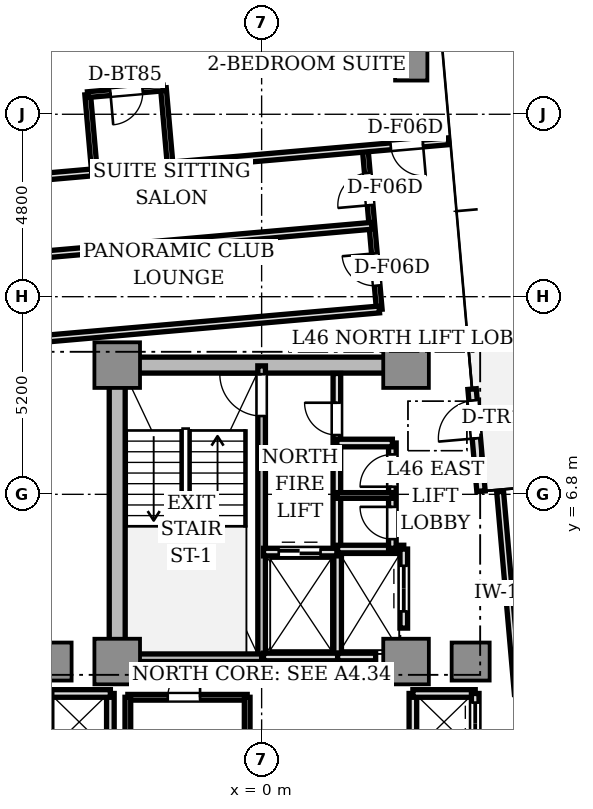
"""IFC4 building model, lengths in metres.
Left out: names, types, materials, properties, quantities, classifications, styles, units other than length and angle.
Written with IfcOpenShell. Run it as: python <this file> out.ifc"""

import sys

from ifc_helpers import new_model, si_unit, direction, frame, frame_2d, origin, origin_2d, place, context, subcontext, project, spatial, rectangle, extrude, source, transform, mapped, element, fill, save


model = new_model("IFC4")
c1 = context("Model", 3, precision=1e-05, world=origin(), true_north=direction((0.0, 1.0)))
c2 = subcontext(c1, "Body", "Model", "MODEL_VIEW")
j1 = project(units=[si_unit("LENGTHUNIT", "METRE"), si_unit("PLANEANGLEUNIT", "RADIAN")], contexts=[c1])
p1 = place(None, origin())
s1 = spatial("IfcSite", under=j1, at=p1, CompositionType="ELEMENT")
p2 = place(p1, origin())
s2 = spatial("IfcBuilding", under=s1, at=p2, CompositionType="ELEMENT")
p3 = place(p2, frame((0.0, 0.0, 167.35)))
s3 = spatial("IfcBuildingStorey", under=s2, at=p3, CompositionType="ELEMENT", Elevation=167.35)
p4 = place(p3, frame((-3.55, 10.2, 0.0), z_axis=(0.0, 0.0, 1.0), x_axis=(1.0, 0.0, 0.0)))
e1 = element("IfcWall", 1, at=p4, inside=s3, PredefinedType="SHEAR", context=c2, shape_type="SweptSolid", body=[
    extrude(rectangle(XDim=7.1, YDim=0.42, at=frame_2d((3.55, 0.0))), origin(), (0.0, 0.0, 1.0), 3.05),
])
p5 = place(p3, frame((-3.8, 2.85, 0.0), z_axis=(0.0, 0.0, 1.0), x_axis=(0.0, 1.0, 0.0)))
e2 = element("IfcWall", 2, at=p5, inside=s3, PredefinedType="SHEAR", context=c2, shape_type="SweptSolid", body=[
    extrude(rectangle(XDim=6.9, YDim=0.42, at=frame_2d((3.45, 0.0))), origin(), (0.0, 0.0, 1.0), 3.05),
])
m1 = source(origin(), c2, "Body", "SweptSolid", [
    extrude(rectangle(XDim=1.2, YDim=1.2, at=origin_2d()), origin(), (0.0, 0.0, 1.0), 3.05),
])
for number, where, z_axis, x_axis in (
    (3, (-3.8, 2.4, 0.0), (0.0, 0.0, 1.0), (1.0, 0.0, 0.0)),
    (4, (3.8, 2.4, 0.0), (0.0, 0.0, 1.0), (1.0, 0.0, 0.0)),
    (5, (-3.8, 10.2, 0.0), (0.0, 0.0, 1.0), (1.0, 0.0, 0.0)),
    (6, (3.8, 10.2, 0.0), (0.0, 0.0, 1.0), (1.0, 0.0, 0.0)),
):
    element("IfcColumn", number, at=place(p3, frame(where, z_axis=z_axis, x_axis=x_axis)), inside=s3, PredefinedType="COLUMN", context=c2, shape_type="MappedRepresentation", body=[
        mapped(m1, transform((0.0, 0.0, 0.0), scale=1.0)),
    ])
m2 = source(origin(), c2, "Body", "SweptSolid", [
    extrude(rectangle(XDim=1.0, YDim=1.0, at=origin_2d()), origin(), (0.0, 0.0, 1.0), 3.05),
])
for number, where, z_axis, x_axis in (
    (7, (5.5, 2.4, 0.0), (0.0, 0.0, 1.0), (1.0, 0.0, 0.0)),
    (8, (-5.5, 2.4, 0.0), (0.0, 0.0, 1.0), (1.0, 0.0, 0.0)),
):
    element("IfcColumn", number, at=place(p3, frame(where, z_axis=z_axis, x_axis=x_axis)), inside=s3, PredefinedType="COLUMN", context=c2, shape_type="MappedRepresentation", body=[
        mapped(m2, transform((0.0, 0.0, 0.0), scale=1.0)),
    ])
m3 = source(origin(), c2, "Body", "SweptSolid", [
    extrude(rectangle(XDim=0.85, YDim=0.85, at=origin_2d()), origin(), (0.0, 0.0, 1.0), 3.05),
])
p6 = place(p3, frame((3.936, 18.112, 0.0), z_axis=(0.0, 0.0, 1.0), x_axis=(1.0, 0.0, 0.0)))
e9 = element("IfcColumn", 9, at=p6, inside=s3, PredefinedType="COLUMN", context=c2, shape_type="MappedRepresentation", body=[
    mapped(m3, transform((0.0, 0.0, 0.0), scale=1.0)),
])
p7 = place(p3, frame((5.772, 6.879, 0.0), z_axis=(0.0, 0.0, 1.0), x_axis=(-0.087168071984, 0.996193619346, 0.0)))
e10 = element("IfcWall", 10, at=p7, inside=s3, PredefinedType="STANDARD", context=c2, shape_type="SweptSolid", body=[
    extrude(rectangle(XDim=2.7, YDim=0.22, at=frame_2d((1.35, 0.0))), origin(), (0.0, 0.0, 1.0), 3.05),
])
p8 = place(p7, frame((1.4, 0.0, 0.0)))
e11 = element("IfcOpeningElement", 11, at=p8, cuts=e10, PredefinedType="OPENING", context=c2, shape_type="SweptSolid", body=[
    extrude(rectangle(XDim=1.0, YDim=2.2, at=frame_2d((0.5, 1.1))), frame((0.0, 0.12, 0.0), z_axis=(0.0, -1.0, 0.0), x_axis=(1.0, 0.0, 0.0)), (0.0, 0.0, 1.0), 0.24),
])
p9 = place(p3, frame((0.0, 2.5, 0.0), z_axis=(0.0, 0.0, 1.0), x_axis=(0.0, 1.0, 0.0)))
e12 = element("IfcWall", 12, at=p9, inside=s3, PredefinedType="SOLIDWALL", context=c2, shape_type="SweptSolid", body=[
    extrude(rectangle(XDim=7.68, YDim=0.2, at=frame_2d((3.84, 0.0))), origin(), (0.0, 0.0, 1.0), 3.05),
])
p10 = place(p9, frame((6.36, 0.0, 0.0)))
e13 = element("IfcOpeningElement", 13, at=p10, cuts=e12, PredefinedType="OPENING", context=c2, shape_type="SweptSolid", body=[
    extrude(rectangle(XDim=1.1, YDim=2.15, at=frame_2d((0.55, 1.075))), frame((0.0, 0.11, 0.0), z_axis=(0.0, -1.0, 0.0), x_axis=(1.0, 0.0, 0.0)), (0.0, 0.0, 1.0), 0.22),
])
p11 = place(p3, frame((-3.72, 2.5, 0.0), z_axis=(0.0, 0.0, 1.0), x_axis=(1.0, 0.0, 0.0)))
e14 = element("IfcWall", 14, at=p11, inside=s3, PredefinedType="SOLIDWALL", context=c2, shape_type="SweptSolid", body=[
    extrude(rectangle(XDim=3.72, YDim=0.2, at=frame_2d((1.86, 0.0))), origin(), (0.0, 0.0, 1.0), 3.05),
])
p12 = place(p3, frame((1.98, 5.32, 0.0), z_axis=(0.0, 0.0, 1.0), x_axis=(0.0, 1.0, 0.0)))
e15 = element("IfcWall", 15, at=p12, inside=s3, PredefinedType="SOLIDWALL", context=c2, shape_type="SweptSolid", body=[
    extrude(rectangle(XDim=4.66, YDim=0.2, at=frame_2d((2.33, 0.0))), origin(), (0.0, 0.0, 1.0), 2.6),
])
p13 = place(p12, frame((3.04, 0.0, 0.0)))
e16 = element("IfcOpeningElement", 16, at=p13, cuts=e15, PredefinedType="OPENING", context=c2, shape_type="SweptSolid", body=[
    extrude(rectangle(XDim=0.85, YDim=2.1, at=frame_2d((0.425, 1.05))), frame((0.0, 0.11, 0.0), z_axis=(0.0, -1.0, 0.0), x_axis=(1.0, 0.0, 0.0)), (0.0, 0.0, 1.0), 0.22),
])
p14 = place(p3, frame((2.0, 2.5, 0.0), z_axis=(0.0, 0.0, 1.0), x_axis=(0.0, 1.0, 0.0)))
e17 = element("IfcWall", 17, at=p14, inside=s3, PredefinedType="SOLIDWALL", context=c2, shape_type="SweptSolid", body=[
    extrude(rectangle(XDim=2.78, YDim=0.2, at=frame_2d((1.39, 0.0))), origin(), (0.0, 0.0, 1.0), 2.6),
])
p15 = place(p3, frame((0.05, 2.52, 0.0), z_axis=(0.0, 0.0, 1.0), x_axis=(1.0, 0.0, 0.0)))
e18 = element("IfcWall", 18, at=p15, inside=s3, PredefinedType="SOLIDWALL", context=c2, shape_type="SweptSolid", body=[
    extrude(rectangle(XDim=1.95, YDim=0.2, at=frame_2d((0.975, 0.0))), origin(), (0.0, 0.0, 1.0), 2.6),
])
p16 = place(p3, frame((0.05, 5.28, 0.0), z_axis=(0.0, 0.0, 1.0), x_axis=(1.0, 0.0, 0.0)))
e19 = element("IfcWall", 19, at=p16, inside=s3, PredefinedType="SOLIDWALL", context=c2, shape_type="SweptSolid", body=[
    extrude(rectangle(XDim=1.93, YDim=0.2, at=frame_2d((0.965, 0.0))), origin(), (0.0, 0.0, 1.0), 2.6),
])
p17 = place(p16, frame((0.4, 0.0, 0.0)))
e20 = element("IfcOpeningElement", 20, at=p17, cuts=e19, PredefinedType="OPENING", context=c2, shape_type="SweptSolid", body=[
    extrude(rectangle(XDim=1.1, YDim=2.2, at=frame_2d((0.55, 1.1))), frame((0.0, 0.11, 0.0), z_axis=(0.0, -1.0, 0.0), x_axis=(1.0, 0.0, 0.0)), (0.0, 0.0, 1.0), 0.22),
])
p18 = place(p3, frame((2.0, 2.52, 0.0), z_axis=(0.0, 0.0, 1.0), x_axis=(1.0, 0.0, 0.0)))
e21 = element("IfcWall", 21, at=p18, inside=s3, PredefinedType="SOLIDWALL", context=c2, shape_type="SweptSolid", body=[
    extrude(rectangle(XDim=1.0, YDim=0.2, at=frame_2d((0.5, 0.0))), origin(), (0.0, 0.0, 1.0), 2.6),
])
p19 = place(p3, frame((2.0, 5.36, 0.0), z_axis=(0.0, 0.0, 1.0), x_axis=(1.0, 0.0, 0.0)))
e22 = element("IfcWall", 22, at=p19, inside=s3, PredefinedType="SOLIDWALL", context=c2, shape_type="SweptSolid", body=[
    extrude(rectangle(XDim=1.74, YDim=0.2, at=frame_2d((0.87, 0.0))), origin(), (0.0, 0.0, 1.0), 2.6),
])
p20 = place(p3, frame((3.74, 3.28, 0.0), z_axis=(0.0, 0.0, 1.0), x_axis=(0.0, 1.0, 0.0)))
e23 = element("IfcWall", 23, at=p20, inside=s3, PredefinedType="SOLIDWALL", context=c2, shape_type="SweptSolid", body=[
    extrude(rectangle(XDim=2.08, YDim=0.2, at=frame_2d((1.04, 0.0))), origin(), (0.0, 0.0, 1.0), 2.6),
])
p21 = place(p20, frame((0.44, 0.0, 0.0)))
e24 = element("IfcOpeningElement", 24, at=p21, cuts=e23, PredefinedType="OPENING", context=c2, shape_type="SweptSolid", body=[
    extrude(rectangle(XDim=1.2, YDim=2.2, at=frame_2d((0.6, 1.1))), frame((0.0, 0.11, 0.0), z_axis=(0.0, -1.0, 0.0), x_axis=(1.0, 0.0, 0.0)), (0.0, 0.0, 1.0), 0.22),
])
p22 = place(p3, frame((3.98, -1.56, 0.0), z_axis=(0.0, 0.0, 1.0), x_axis=(0.0, 1.0, 0.0)))
e25 = element("IfcWall", 25, at=p22, inside=s3, PredefinedType="SOLIDWALL", context=c2, shape_type="SweptSolid", body=[
    extrude(rectangle(XDim=3.12, YDim=0.2, at=frame_2d((1.56, 0.0))), origin(), (0.0, 0.0, 1.0), 2.22),
])
p23 = place(p3, frame((3.98, 1.56, 0.0), z_axis=(0.0, 0.0, 1.0), x_axis=(1.0, 0.0, 0.0)))
e26 = element("IfcWall", 26, at=p23, inside=s3, PredefinedType="SOLIDWALL", context=c2, shape_type="SweptSolid", body=[
    extrude(rectangle(XDim=1.64, YDim=0.2, at=frame_2d((0.82, 0.0))), origin(), (0.0, 0.0, 1.0), 2.6),
])
p24 = place(p3, frame((5.62, 0.0, 0.0), z_axis=(0.0, 0.0, 1.0), x_axis=(0.0, 1.0, 0.0)))
e27 = element("IfcWall", 27, at=p24, inside=s3, PredefinedType="SOLIDWALL", context=c2, shape_type="SweptSolid", body=[
    extrude(rectangle(XDim=1.56, YDim=0.2, at=frame_2d((0.78, 0.0))), origin(), (0.0, 0.0, 1.0), 2.6),
])
p25 = place(p24, frame((0.22, 0.0, 0.0)))
e28 = element("IfcOpeningElement", 28, at=p25, cuts=e27, PredefinedType="OPENING", context=c2, shape_type="SweptSolid", body=[
    extrude(rectangle(XDim=1.1, YDim=2.2, at=frame_2d((0.55, 1.1))), frame((0.0, 0.11, 0.0), z_axis=(0.0, -1.0, 0.0), x_axis=(1.0, 0.0, 0.0)), (0.0, 0.0, 1.0), 0.22),
])
p26 = place(p3, frame((-3.98, -1.56, 0.0), z_axis=(0.0, 0.0, 1.0), x_axis=(0.0, 1.0, 0.0)))
e29 = element("IfcWall", 29, at=p26, inside=s3, PredefinedType="SOLIDWALL", context=c2, shape_type="SweptSolid", body=[
    extrude(rectangle(XDim=3.12, YDim=0.2, at=frame_2d((1.56, 0.0))), origin(), (0.0, 0.0, 1.0), 2.22),
])
p27 = place(p3, frame((-5.62, 1.56, 0.0), z_axis=(0.0, 0.0, 1.0), x_axis=(1.0, 0.0, 0.0)))
e30 = element("IfcWall", 30, at=p27, inside=s3, PredefinedType="SOLIDWALL", context=c2, shape_type="SweptSolid", body=[
    extrude(rectangle(XDim=1.64, YDim=0.2, at=frame_2d((0.82, 0.0))), origin(), (0.0, 0.0, 1.0), 2.6),
])
p28 = place(p3, frame((3.44, 5.38, 0.0), z_axis=(0.0, 0.0, 1.0), x_axis=(0.0, 1.0, 0.0)))
e31 = element("IfcWall", 31, at=p28, inside=s3, PredefinedType="SOLIDWALL", context=c2, shape_type="SweptSolid", body=[
    extrude(rectangle(XDim=2.77, YDim=0.2, at=frame_2d((1.385, 0.0))), origin(), (0.0, 0.0, 1.0), 2.6),
])
p29 = place(p28, frame((0.24, 0.0, 0.0)))
e32 = element("IfcOpeningElement", 32, at=p29, cuts=e31, PredefinedType="OPENING", context=c2, shape_type="SweptSolid", body=[
    extrude(rectangle(XDim=0.85, YDim=2.1, at=frame_2d((0.425, 1.05))), frame((0.0, 0.11, 0.0), z_axis=(0.0, -1.0, 0.0), x_axis=(1.0, 0.0, 0.0)), (0.0, 0.0, 1.0), 0.22),
])
p30 = place(p28, frame((1.62, 0.0, 0.0)))
e33 = element("IfcOpeningElement", 33, at=p30, cuts=e31, PredefinedType="OPENING", context=c2, shape_type="SweptSolid", body=[
    extrude(rectangle(XDim=0.85, YDim=2.1, at=frame_2d((0.425, 1.05))), frame((0.0, 0.11, 0.0), z_axis=(0.0, -1.0, 0.0), x_axis=(1.0, 0.0, 0.0)), (0.0, 0.0, 1.0), 0.22),
])
p31 = place(p3, frame((1.98, 8.15, 0.0), z_axis=(0.0, 0.0, 1.0), x_axis=(1.0, 0.0, 0.0)))
e34 = element("IfcWall", 34, at=p31, inside=s3, PredefinedType="SOLIDWALL", context=c2, shape_type="SweptSolid", body=[
    extrude(rectangle(XDim=1.46, YDim=0.2, at=frame_2d((0.73, 0.0))), origin(), (0.0, 0.0, 1.0), 2.6),
])
p32 = place(p3, frame((1.98, 6.77, 0.0), z_axis=(0.0, 0.0, 1.0), x_axis=(1.0, 0.0, 0.0)))
e35 = element("IfcWall", 35, at=p32, inside=s3, PredefinedType="PARTITIONING", context=c2, shape_type="SweptSolid", body=[
    extrude(rectangle(XDim=1.46, YDim=0.15, at=frame_2d((0.73, 0.0))), origin(), (0.0, 0.0, 1.0), 2.6),
])
p33 = place(p3, frame((-3.52, 1.46, 0.0), z_axis=(0.0, 0.0, 1.0), x_axis=(1.0, 0.0, 0.0)))
e36 = element("IfcWall", 36, at=p33, inside=s3, PredefinedType="PARTITIONING", context=c2, shape_type="SweptSolid", body=[
    extrude(rectangle(XDim=3.14, YDim=0.15, at=frame_2d((1.57, 0.0))), origin(), (0.0, 0.0, 1.0), 2.6),
])
p34 = place(p33, frame((1.05, 0.0, 0.0)))
e37 = element("IfcOpeningElement", 37, at=p34, cuts=e36, PredefinedType="OPENING", context=c2, shape_type="SweptSolid", body=[
    extrude(rectangle(XDim=0.85, YDim=2.1, at=frame_2d((0.425, 1.05))), frame((0.0, 0.085, 0.0), z_axis=(0.0, -1.0, 0.0), x_axis=(1.0, 0.0, 0.0)), (0.0, 0.0, 1.0), 0.17),
])
p35 = place(p3, frame((-3.52, 0.1, 0.0), z_axis=(0.0, 0.0, 1.0), x_axis=(0.0, 1.0, 0.0)))
e38 = element("IfcWall", 38, at=p35, inside=s3, PredefinedType="PARTITIONING", context=c2, shape_type="SweptSolid", body=[
    extrude(rectangle(XDim=1.36, YDim=0.15, at=frame_2d((0.68, 0.0))), origin(), (0.0, 0.0, 1.0), 2.22),
])
p36 = place(p3, frame((-0.38, 0.1, 0.0), z_axis=(0.0, 0.0, 1.0), x_axis=(0.0, 1.0, 0.0)))
e39 = element("IfcWall", 39, at=p36, inside=s3, PredefinedType="PARTITIONING", context=c2, shape_type="SweptSolid", body=[
    extrude(rectangle(XDim=1.36, YDim=0.15, at=frame_2d((0.68, 0.0))), origin(), (0.0, 0.0, 1.0), 2.6),
])
p37 = place(p3, frame((6.741, 1.543, 0.0), z_axis=(0.0, 0.0, 1.0), x_axis=(-0.087161289348, 0.996194212812, 0.0)))
e40 = element("IfcWall", 40, at=p37, inside=s3, PredefinedType="PARTITIONING", context=c2, shape_type="SweptSolid", body=[
    extrude(rectangle(XDim=5.35, YDim=0.18, at=frame_2d((2.675, 0.0))), origin(), (0.0, 0.0, 1.0), 2.6),
])
p38 = place(p3, frame((3.095, 11.664, 0.0), z_axis=(0.0, 0.0, 1.0), x_axis=(-0.087142722004, 0.996195837173, 0.0)))
e41 = element("IfcWall", 41, at=p38, inside=s3, PredefinedType="PARTITIONING", context=c2, shape_type="SweptSolid", body=[
    extrude(rectangle(XDim=4.25, YDim=0.15, at=frame_2d((2.125, 0.0))), origin(), (0.0, 0.0, 1.0), 2.6),
])
p39 = place(p38, frame((0.63, 0.0, 0.0)))
e42 = element("IfcOpeningElement", 42, at=p39, cuts=e41, PredefinedType="OPENING", context=c2, shape_type="SweptSolid", body=[
    extrude(rectangle(XDim=0.85, YDim=2.1, at=frame_2d((0.425, 1.05))), frame((0.0, 0.085, 0.0), z_axis=(0.0, -1.0, 0.0), x_axis=(1.0, 0.0, 0.0)), (0.0, 0.0, 1.0), 0.17),
])
p40 = place(p38, frame((2.755, 0.0, 0.0)))
e43 = element("IfcOpeningElement", 43, at=p40, cuts=e41, PredefinedType="OPENING", context=c2, shape_type="SweptSolid", body=[
    extrude(rectangle(XDim=0.85, YDim=2.1, at=frame_2d((0.425, 1.05))), frame((0.0, 0.085, 0.0), z_axis=(0.0, -1.0, 0.0), x_axis=(1.0, 0.0, 0.0)), (0.0, 0.0, 1.0), 0.17),
])
p41 = place(p3, frame((3.095, 11.664, 0.0), z_axis=(0.0, 0.0, 1.0), x_axis=(-0.996196061386, -0.087140158824, 0.0)))
e44 = element("IfcWall", 44, at=p41, inside=s3, PredefinedType="PARTITIONING", context=c2, shape_type="SweptSolid", body=[
    extrude(rectangle(XDim=10.4, YDim=0.18, at=frame_2d((5.2, 0.0))), origin(), (0.0, 0.0, 1.0), 2.6),
])
p42 = place(p3, frame((2.903, 13.866, 0.0), z_axis=(0.0, 0.0, 1.0), x_axis=(-0.996194201607, -0.087161417409, 0.0)))
e45 = element("IfcWall", 45, at=p42, inside=s3, PredefinedType="PARTITIONING", context=c2, shape_type="SweptSolid", body=[
    extrude(rectangle(XDim=10.4, YDim=0.18, at=frame_2d((5.2, 0.0))), origin(), (0.0, 0.0, 1.0), 2.6),
])
p43 = place(p3, frame((4.917, 16.09, 0.0), z_axis=(0.0, 0.0, 1.0), x_axis=(-0.996196619285, -0.087133780622, 0.0)))
e46 = element("IfcWall", 46, at=p43, inside=s3, PredefinedType="PARTITIONING", context=c2, shape_type="SweptSolid", body=[
    extrude(rectangle(XDim=12.6, YDim=0.18, at=frame_2d((6.3, 0.0))), origin(), (0.0, 0.0, 1.0), 2.6),
])
p44 = place(p43, frame((0.675, 0.0, 0.0)))
e47 = element("IfcOpeningElement", 47, at=p44, cuts=e46, PredefinedType="OPENING", context=c2, shape_type="SweptSolid", body=[
    extrude(rectangle(XDim=0.85, YDim=2.1, at=frame_2d((0.425, 1.05))), frame((0.0, 0.1, 0.0), z_axis=(0.0, -1.0, 0.0), x_axis=(1.0, 0.0, 0.0)), (0.0, 0.0, 1.0), 0.2),
])
for number, where, z_axis, x_axis in (
    (48, (-4.398, 15.275, 0.0), (0.0, 0.0, 1.0), (-0.087, 0.996, 0.0)),
    (49, (-2.406, 15.449, 0.0), (0.0, 0.0, 1.0), (-0.087, 0.996, 0.0)),
):
    element("IfcWall", number, at=place(p3, frame(where, z_axis=z_axis, x_axis=x_axis)), inside=s3, PredefinedType="PARTITIONING", context=c2, shape_type="SweptSolid", body=[
        extrude(rectangle(XDim=2.05, YDim=0.15, at=frame_2d((1.025, 0.0))), origin(), (0.0, 0.0, 1.0), 2.6),
    ])
p45 = place(p3, frame((-2.584, 17.491, 0.0), z_axis=(0.0, 0.0, 1.0), x_axis=(-0.99619464492, -0.087156350505, 0.0)))
e50 = element("IfcWall", 50, at=p45, inside=s3, PredefinedType="PARTITIONING", context=c2, shape_type="SweptSolid", body=[
    extrude(rectangle(XDim=2.0, YDim=0.15, at=frame_2d((1.0, 0.0))), origin(), (0.0, 0.0, 1.0), 2.57),
])
p46 = place(p45, frame((0.55, 0.0, 0.0)))
e51 = element("IfcOpeningElement", 51, at=p46, cuts=e50, PredefinedType="OPENING", context=c2, shape_type="SweptSolid", body=[
    extrude(rectangle(XDim=0.85, YDim=2.1, at=frame_2d((0.425, 1.05))), frame((0.0, 0.085, 0.0), z_axis=(0.0, -1.0, 0.0), x_axis=(1.0, 0.0, 0.0)), (0.0, 0.0, 1.0), 0.17),
])
m4 = source(origin(), c2, "Body", "SweptSolid", [
    extrude(rectangle(XDim=1.0, YDim=0.05, at=origin_2d()), origin(), (0.0, 0.0, 1.0), 2.2),
])
p47 = place(p8, frame((0.5, 0.0, 0.0)))
e52 = element("IfcDoor", 52, at=p47, inside=s3, OperationType="SINGLE_SWING_LEFT", PredefinedType="DOOR", context=c2, shape_type="MappedRepresentation", body=[
    mapped(m4, transform((0.0, 0.0, 0.0), scale=1.0)),
])
fill(e11, e52)
m5 = source(origin(), c2, "Body", "SweptSolid", [
    extrude(rectangle(XDim=1.1, YDim=0.05, at=origin_2d()), origin(), (0.0, 0.0, 1.0), 2.15),
])
p48 = place(p10, frame((0.55, 0.0, 0.0)))
e53 = element("IfcDoor", 53, at=p48, inside=s3, OperationType="SINGLE_SWING_RIGHT", PredefinedType="DOOR", context=c2, shape_type="MappedRepresentation", body=[
    mapped(m5, transform((0.0, 0.0, 0.0), scale=1.0)),
])
fill(e13, e53)
m6 = source(origin(), c2, "Body", "SweptSolid", [
    extrude(rectangle(XDim=0.85, YDim=0.05, at=origin_2d()), origin(), (0.0, 0.0, 1.0), 2.1),
])
p49 = place(p13, frame((0.425, 0.0, 0.0)))
e54 = element("IfcDoor", 54, at=p49, inside=s3, OperationType="SINGLE_SWING_RIGHT", PredefinedType="DOOR", context=c2, shape_type="MappedRepresentation", body=[
    mapped(m6, transform((0.0, 0.0, 0.0), scale=1.0)),
])
fill(e16, e54)
m7 = source(origin(), c2, "Body", "SweptSolid", [
    extrude(rectangle(XDim=1.1, YDim=0.05, at=origin_2d()), origin(), (0.0, 0.0, 1.0), 2.2),
])
p50 = place(p17, frame((0.55, 0.0, 0.0)))
e55 = element("IfcDoor", 55, at=p50, inside=s3, OperationType="DOUBLE_DOOR_SLIDING", PredefinedType="DOOR", context=c2, shape_type="MappedRepresentation", body=[
    mapped(m7, transform((0.0, 0.0, 0.0), scale=1.0)),
])
fill(e20, e55)
m8 = source(origin(), c2, "Body", "SweptSolid", [
    extrude(rectangle(XDim=1.2, YDim=0.05, at=origin_2d()), origin(), (0.0, 0.0, 1.0), 2.2),
])
p51 = place(p21, frame((0.6, 0.0, 0.0)))
e56 = element("IfcDoor", 56, at=p51, inside=s3, OperationType="DOUBLE_DOOR_SLIDING", PredefinedType="DOOR", context=c2, shape_type="MappedRepresentation", body=[
    mapped(m8, transform((0.0, 0.0, 0.0), scale=1.0)),
])
fill(e24, e56)
p52 = place(p25, frame((0.55, 0.0, 0.0)))
e57 = element("IfcDoor", 57, at=p52, inside=s3, OperationType="DOUBLE_DOOR_SLIDING", PredefinedType="DOOR", context=c2, shape_type="MappedRepresentation", body=[
    mapped(m7, transform((0.0, 0.0, 0.0), scale=1.0)),
])
fill(e28, e57)
p53 = place(p29, frame((0.425, 0.0, 0.0)))
e58 = element("IfcDoor", 58, at=p53, inside=s3, OperationType="SINGLE_SWING_RIGHT", PredefinedType="DOOR", context=c2, shape_type="MappedRepresentation", body=[
    mapped(m6, transform((0.0, 0.0, 0.0), scale=1.0)),
])
fill(e32, e58)
p54 = place(p30, frame((0.425, 0.0, 0.0)))
e59 = element("IfcDoor", 59, at=p54, inside=s3, OperationType="SINGLE_SWING_LEFT", PredefinedType="DOOR", context=c2, shape_type="MappedRepresentation", body=[
    mapped(m6, transform((0.0, 0.0, 0.0), scale=1.0)),
])
fill(e33, e59)
p55 = place(p34, frame((0.425, 0.0, 0.0)))
e60 = element("IfcDoor", 60, at=p55, inside=s3, OperationType="SINGLE_SWING_RIGHT", PredefinedType="DOOR", context=c2, shape_type="MappedRepresentation", body=[
    mapped(m6, transform((0.0, 0.0, 0.0), scale=1.0)),
])
fill(e37, e60)
p56 = place(p39, frame((0.425, 0.0, 0.0)))
e61 = element("IfcDoor", 61, at=p56, inside=s3, OperationType="SINGLE_SWING_RIGHT", PredefinedType="DOOR", context=c2, shape_type="MappedRepresentation", body=[
    mapped(m6, transform((0.0, 0.0, 0.0), scale=1.0)),
])
fill(e42, e61)
p57 = place(p40, frame((0.425, 0.0, 0.0)))
e62 = element("IfcDoor", 62, at=p57, inside=s3, OperationType="SINGLE_SWING_LEFT", PredefinedType="DOOR", context=c2, shape_type="MappedRepresentation", body=[
    mapped(m6, transform((0.0, 0.0, 0.0), scale=1.0)),
])
fill(e43, e62)
p58 = place(p46, frame((0.425, 0.0, 0.0)))
e63 = element("IfcDoor", 63, at=p58, inside=s3, OperationType="SINGLE_SWING_RIGHT", PredefinedType="DOOR", context=c2, shape_type="MappedRepresentation", body=[
    mapped(m6, transform((0.0, 0.0, 0.0), scale=1.0)),
])
fill(e51, e63)
p59 = place(p44, frame((0.425, 0.0, 0.0)))
e64 = element("IfcDoor", 64, at=p59, inside=s3, OperationType="SINGLE_SWING_LEFT", PredefinedType="DOOR", context=c2, shape_type="MappedRepresentation", body=[
    mapped(m6, transform((0.0, 0.0, 0.0), scale=1.0)),
])
fill(e47, e64)
save(model, sys.argv[1])
